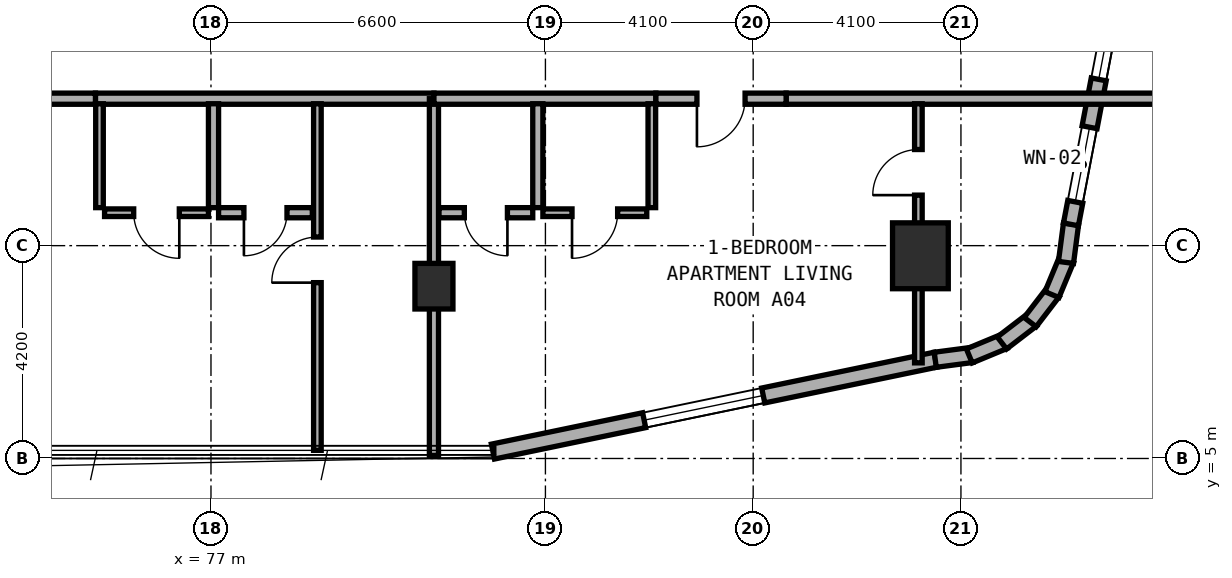
"""IFC4 building model, lengths in metres.
Left out: names, types, materials, properties, quantities, classifications, styles, units other than length and angle.
Written with IfcOpenShell. Run it as: python <this file> out.ifc"""

import sys

from ifc_helpers import new_model, si_unit, direction, frame, frame_2d, origin, origin_2d, place, context, subcontext, project, spatial, rectangle, extrude, element, fill, save


model = new_model("IFC4")
c1 = context("Model", 3, precision=1e-05, world=origin(), true_north=direction((0.0, 1.0)))
c2 = subcontext(c1, "Body", "Model", "MODEL_VIEW")
j1 = project(units=[si_unit("LENGTHUNIT", "METRE"), si_unit("PLANEANGLEUNIT", "RADIAN")], contexts=[c1])
p1 = place(None, origin())
s1 = spatial("IfcSite", under=j1, at=p1, CompositionType="ELEMENT")
p2 = place(p1, origin())
s2 = spatial("IfcBuilding", under=s1, at=p2, CompositionType="ELEMENT")
p3 = place(p2, frame((0.0, 0.0, 24.0)))
s3 = spatial("IfcBuildingStorey", under=s2, at=p3, CompositionType="ELEMENT", Elevation=24.0)
p4 = place(p3, frame((81.4, 8.4, 0.0), z_axis=(0.0, 0.0, 1.0), x_axis=(1.0, 0.0, 0.0)))
e1 = element("IfcColumn", 1, at=p4, inside=s3, PredefinedType="COLUMN", context=c2, shape_type="SweptSolid", body=[
    extrude(rectangle(XDim=0.75, YDim=0.9, at=origin_2d()), origin(), (0.0, 0.0, 1.0), 3.5),
])
p5 = place(p3, frame((91.0, 9.0, 0.0), z_axis=(0.0, 0.0, 1.0), x_axis=(1.0, 0.0, 0.0)))
e2 = element("IfcColumn", 2, at=p5, inside=s3, PredefinedType="COLUMN", context=c2, shape_type="SweptSolid", body=[
    extrude(rectangle(XDim=1.1, YDim=1.3, at=origin_2d()), origin(), (0.0, 0.0, 1.0), 3.5),
])
p6 = place(p3, frame((82.564, 5.136, 0.0), z_axis=(0.0, 0.0, 1.0), x_axis=(0.979128391325, 0.203242695569, 0.0)))
e3 = element("IfcWall", 3, at=p6, inside=s3, PredefinedType="STANDARD", context=c2, shape_type="SweptSolid", body=[
    extrude(rectangle(XDim=8.92, YDim=0.3, at=frame_2d((4.46, 0.0))), origin(), (0.0, 0.0, 1.0), 3.25),
])
p7 = place(p6, frame((3.048, 0.0, 0.8)))
e4 = element("IfcOpeningElement", 4, at=p7, cuts=e3, PredefinedType="OPENING", context=c2, shape_type="SweptSolid", body=[
    extrude(rectangle(XDim=2.4, YDim=1.6, at=frame_2d((1.2, 0.8))), frame((0.0, 0.16, 0.0), z_axis=(0.0, -1.0, 0.0), x_axis=(1.0, 0.0, 0.0)), (0.0, 0.0, 1.0), 0.32),
])
p8 = place(p3, frame((91.293, 6.948, 0.0), z_axis=(0.0, 0.0, 1.0), x_axis=(0.991486167159, 0.13021205909, 0.0)))
e5 = element("IfcWall", 5, at=p8, inside=s3, PredefinedType="STANDARD", context=c2, shape_type="SweptSolid", body=[
    extrude(rectangle(XDim=0.729, YDim=0.3, at=frame_2d((0.365, 0.0))), origin(), (0.0, 0.0, 1.0), 3.25),
])
for number, where, z_axis, x_axis in (
    (6, (91.965, 7.024, 0.0), (0.0, 0.0, 1.0), (0.924, 0.384, 0.0)),
    (7, (92.609, 7.279, 0.0), (0.0, 0.0, 1.0), (0.794, 0.608, 0.0)),
    (8, (93.166, 7.691, 0.0), (0.0, 0.0, 1.0), (0.609, 0.793, 0.0)),
):
    element("IfcWall", number, at=place(p3, frame(where, z_axis=z_axis, x_axis=x_axis)), inside=s3, PredefinedType="STANDARD", context=c2, shape_type="SweptSolid", body=[
        extrude(rectangle(XDim=0.746, YDim=0.3, at=frame_2d((0.373, 0.0))), origin(), (0.0, 0.0, 1.0), 3.25),
    ])
p9 = place(p3, frame((93.596, 8.234, 0.0), z_axis=(0.0, 0.0, 1.0), x_axis=(0.383430326427, 0.923569805037, 0.0)))
e9 = element("IfcWall", 9, at=p9, inside=s3, PredefinedType="STANDARD", context=c2, shape_type="SweptSolid", body=[
    extrude(rectangle(XDim=0.746, YDim=0.3, at=frame_2d((0.373, 0.0))), origin(), (0.0, 0.0, 1.0), 3.25),
])
p10 = place(p3, frame((93.873, 8.869, 0.0), z_axis=(0.0, 0.0, 1.0), x_axis=(0.129339184068, 0.991600411186, 0.0)))
e10 = element("IfcWall", 10, at=p10, inside=s3, PredefinedType="STANDARD", context=c2, shape_type="SweptSolid", body=[
    extrude(rectangle(XDim=0.764, YDim=0.3, at=frame_2d((0.382, 0.0))), origin(), (0.0, 0.0, 1.0), 3.25),
])
p11 = place(p3, frame((93.971, 9.62, 0.0), z_axis=(0.0, 0.0, 1.0), x_axis=(0.188087874316, 0.982152203854, 0.0)))
e11 = element("IfcWall", 11, at=p11, inside=s3, PredefinedType="STANDARD", context=c2, shape_type="SweptSolid", body=[
    extrude(rectangle(XDim=9.634, YDim=0.3, at=frame_2d((4.817, 0.0))), origin(), (0.0, 0.0, 1.0), 3.25),
])
p12 = place(p11, frame((0.452, 0.0, 0.85)))
e12 = element("IfcOpeningElement", 12, at=p12, cuts=e11, PredefinedType="OPENING", context=c2, shape_type="SweptSolid", body=[
    extrude(rectangle(XDim=1.5, YDim=1.5, at=frame_2d((0.75, 0.75))), frame((0.0, 0.16, 0.0), z_axis=(0.0, -1.0, 0.0), x_axis=(1.0, 0.0, 0.0)), (0.0, 0.0, 1.0), 0.32),
])
p13 = place(p11, frame((2.913, 0.0, 0.85)))
e13 = element("IfcOpeningElement", 13, at=p13, cuts=e11, PredefinedType="OPENING", context=c2, shape_type="SweptSolid", body=[
    extrude(rectangle(XDim=1.2, YDim=1.5, at=frame_2d((0.6, 0.75))), frame((0.0, 0.16, 0.0), z_axis=(0.0, -1.0, 0.0), x_axis=(1.0, 0.0, 0.0)), (0.0, 0.0, 1.0), 0.32),
])
p14 = place(p11, frame((5.928, 0.0, 0.8)))
e14 = element("IfcOpeningElement", 14, at=p14, cuts=e11, PredefinedType="OPENING", context=c2, shape_type="SweptSolid", body=[
    extrude(rectangle(XDim=2.4, YDim=1.6, at=frame_2d((1.2, 0.8))), frame((0.0, 0.16, 0.0), z_axis=(0.0, -1.0, 0.0), x_axis=(1.0, 0.0, 0.0)), (0.0, 0.0, 1.0), 0.32),
])
p15 = place(p3, frame((74.72, 12.1, 0.0), z_axis=(0.0, 0.0, 1.0), x_axis=(1.0, 0.0, 0.0)))
e15 = element("IfcWall", 15, at=p15, inside=s3, PredefinedType="SOLIDWALL", context=c2, shape_type="SweptSolid", body=[
    extrude(rectangle(XDim=6.68, YDim=0.22, at=frame_2d((3.34, 0.0))), origin(), (0.0, 0.0, 1.0), 2.725),
])
p16 = place(p3, frame((65.85, 12.1, 0.0), z_axis=(0.0, 0.0, 1.0), x_axis=(1.0, 0.0, 0.0)))
e16 = element("IfcWall", 16, at=p16, inside=s3, PredefinedType="SOLIDWALL", context=c2, shape_type="SweptSolid", body=[
    extrude(rectangle(XDim=8.87, YDim=0.22, at=frame_2d((4.435, 0.0))), origin(), (0.0, 0.0, 1.0), 2.725),
])
p17 = place(p16, frame((3.96, 0.0, 0.0)))
e17 = element("IfcOpeningElement", 17, at=p17, cuts=e16, PredefinedType="OPENING", context=c2, shape_type="SweptSolid", body=[
    extrude(rectangle(XDim=0.95, YDim=2.1, at=frame_2d((0.475, 1.05))), frame((0.0, 0.12, 0.0), z_axis=(0.0, -1.0, 0.0), x_axis=(1.0, 0.0, 0.0)), (0.0, 0.0, 1.0), 0.24),
])
p18 = place(p3, frame((79.1, 5.16, 0.0), z_axis=(0.0, 0.0, 1.0), x_axis=(0.0, 1.0, 0.0)))
e18 = element("IfcWall", 18, at=p18, inside=s3, PredefinedType="PARTITIONING", context=c2, shape_type="SweptSolid", body=[
    extrude(rectangle(XDim=6.84, YDim=0.15, at=frame_2d((3.42, 0.0))), origin(), (0.0, 0.0, 1.0), 2.865),
])
p19 = place(p18, frame((3.31, 0.0, 0.0)))
e19 = element("IfcOpeningElement", 19, at=p19, cuts=e18, PredefinedType="OPENING", context=c2, shape_type="SweptSolid", body=[
    extrude(rectangle(XDim=0.9, YDim=2.1, at=frame_2d((0.45, 1.05))), frame((0.0, 0.085, 0.0), z_axis=(0.0, -1.0, 0.0), x_axis=(1.0, 0.0, 0.0)), (0.0, 0.0, 1.0), 0.17),
])
p20 = place(p3, frame((77.05, 9.95, 0.0), z_axis=(0.0, 0.0, 1.0), x_axis=(0.0, 1.0, 0.0)))
e20 = element("IfcWall", 20, at=p20, inside=s3, PredefinedType="PLUMBINGWALL", context=c2, shape_type="SweptSolid", body=[
    extrude(rectangle(XDim=2.05, YDim=0.2, at=frame_2d((1.025, 0.0))), origin(), (0.0, 0.0, 1.0), 2.985),
])
p21 = place(p3, frame((74.8, 9.95, 0.0), z_axis=(0.0, 0.0, 1.0), x_axis=(0.0, 1.0, 0.0)))
e21 = element("IfcWall", 21, at=p21, inside=s3, PredefinedType="PARTITIONING", context=c2, shape_type="SweptSolid", body=[
    extrude(rectangle(XDim=2.05, YDim=0.15, at=frame_2d((1.025, 0.0))), origin(), (0.0, 0.0, 1.0), 2.985),
])
p22 = place(p3, frame((77.15, 9.85, 0.0), z_axis=(0.0, 0.0, 1.0), x_axis=(1.0, 0.0, 0.0)))
e22 = element("IfcWall", 22, at=p22, inside=s3, PredefinedType="PLUMBINGWALL", context=c2, shape_type="SweptSolid", body=[
    extrude(rectangle(XDim=1.85, YDim=0.2, at=frame_2d((0.925, 0.0))), origin(), (0.0, 0.0, 1.0), 3.22),
])
p23 = place(p22, frame((0.5, 0.0, 0.0)))
e23 = element("IfcOpeningElement", 23, at=p23, cuts=e22, PredefinedType="OPENING", context=c2, shape_type="SweptSolid", body=[
    extrude(rectangle(XDim=0.85, YDim=2.1, at=frame_2d((0.425, 1.05))), frame((0.0, 0.11, 0.0), z_axis=(0.0, -1.0, 0.0), x_axis=(1.0, 0.0, 0.0)), (0.0, 0.0, 1.0), 0.22),
])
p24 = place(p3, frame((74.9, 9.85, 0.0), z_axis=(0.0, 0.0, 1.0), x_axis=(1.0, 0.0, 0.0)))
e24 = element("IfcWall", 24, at=p24, inside=s3, PredefinedType="PARTITIONING", context=c2, shape_type="SweptSolid", body=[
    extrude(rectangle(XDim=2.05, YDim=0.15, at=frame_2d((1.025, 0.0))), origin(), (0.0, 0.0, 1.0), 3.22),
])
p25 = place(p24, frame((0.575, 0.0, 0.0)))
e25 = element("IfcOpeningElement", 25, at=p25, cuts=e24, PredefinedType="OPENING", context=c2, shape_type="SweptSolid", body=[
    extrude(rectangle(XDim=0.9, YDim=2.1, at=frame_2d((0.45, 1.05))), frame((0.0, 0.085, 0.0), z_axis=(0.0, -1.0, 0.0), x_axis=(1.0, 0.0, 0.0)), (0.0, 0.0, 1.0), 0.17),
])
p26 = place(p3, frame((81.4, 5.06, 0.0), z_axis=(0.0, 0.0, 1.0), x_axis=(0.0, 1.0, 0.0)))
e26 = element("IfcWall", 26, at=p26, inside=s3, PredefinedType="SOLIDWALL", context=c2, shape_type="SweptSolid", body=[
    extrude(rectangle(XDim=7.04, YDim=0.18, at=frame_2d((3.52, 0.0))), origin(), (0.0, 0.0, 1.0), 2.725),
])
p27 = place(p3, frame((81.4, 12.1, 0.0), z_axis=(0.0, 0.0, 1.0), x_axis=(1.0, 0.0, 0.0)))
e27 = element("IfcWall", 27, at=p27, inside=s3, PredefinedType="SOLIDWALL", context=c2, shape_type="SweptSolid", body=[
    extrude(rectangle(XDim=4.38, YDim=0.22, at=frame_2d((2.19, 0.0))), origin(), (0.0, 0.0, 1.0), 2.725),
])
p28 = place(p3, frame((88.35, 12.1, 0.0), z_axis=(0.0, 0.0, 1.0), x_axis=(1.0, 0.0, 0.0)))
e28 = element("IfcWall", 28, at=p28, inside=s3, PredefinedType="SOLIDWALL", context=c2, shape_type="SweptSolid", body=[
    extrude(rectangle(XDim=7.41, YDim=0.22, at=frame_2d((3.705, 0.0))), origin(), (0.0, 0.0, 1.0), 2.865),
])
p29 = place(p3, frame((85.78, 12.1, 0.0), z_axis=(0.0, 0.0, 1.0), x_axis=(1.0, 0.0, 0.0)))
e29 = element("IfcWall", 29, at=p29, inside=s3, PredefinedType="SOLIDWALL", context=c2, shape_type="SweptSolid", body=[
    extrude(rectangle(XDim=2.57, YDim=0.22, at=frame_2d((1.285, 0.0))), origin(), (0.0, 0.0, 1.0), 3.22),
])
p30 = place(p29, frame((0.81, 0.0, 0.0)))
e30 = element("IfcOpeningElement", 30, at=p30, cuts=e29, PredefinedType="OPENING", context=c2, shape_type="SweptSolid", body=[
    extrude(rectangle(XDim=0.95, YDim=2.1, at=frame_2d((0.475, 1.05))), frame((0.0, 0.12, 0.0), z_axis=(0.0, -1.0, 0.0), x_axis=(1.0, 0.0, 0.0)), (0.0, 0.0, 1.0), 0.24),
])
p31 = place(p3, frame((90.96, 6.887, 0.0), z_axis=(0.0, 0.0, 1.0), x_axis=(0.0, 1.0, 0.0)))
e31 = element("IfcWall", 31, at=p31, inside=s3, PredefinedType="PARTITIONING", context=c2, shape_type="SweptSolid", body=[
    extrude(rectangle(XDim=5.113, YDim=0.15, at=frame_2d((2.557, 0.0))), origin(), (0.0, 0.0, 1.0), 2.865),
])
p32 = place(p31, frame((3.31, 0.0, 0.0)))
e32 = element("IfcOpeningElement", 32, at=p32, cuts=e31, PredefinedType="OPENING", context=c2, shape_type="SweptSolid", body=[
    extrude(rectangle(XDim=0.9, YDim=2.1, at=frame_2d((0.45, 1.05))), frame((0.0, 0.085, 0.0), z_axis=(0.0, -1.0, 0.0), x_axis=(1.0, 0.0, 0.0)), (0.0, 0.0, 1.0), 0.17),
])
p33 = place(p3, frame((83.45, 9.95, 0.0), z_axis=(0.0, 0.0, 1.0), x_axis=(0.0, 1.0, 0.0)))
e33 = element("IfcWall", 33, at=p33, inside=s3, PredefinedType="PLUMBINGWALL", context=c2, shape_type="SweptSolid", body=[
    extrude(rectangle(XDim=2.05, YDim=0.2, at=frame_2d((1.025, 0.0))), origin(), (0.0, 0.0, 1.0), 3.22),
])
p34 = place(p3, frame((85.7, 9.95, 0.0), z_axis=(0.0, 0.0, 1.0), x_axis=(0.0, 1.0, 0.0)))
e34 = element("IfcWall", 34, at=p34, inside=s3, PredefinedType="PARTITIONING", context=c2, shape_type="SweptSolid", body=[
    extrude(rectangle(XDim=2.05, YDim=0.15, at=frame_2d((1.025, 0.0))), origin(), (0.0, 0.0, 1.0), 3.22),
])
p35 = place(p3, frame((81.5, 9.85, 0.0), z_axis=(0.0, 0.0, 1.0), x_axis=(1.0, 0.0, 0.0)))
e35 = element("IfcWall", 35, at=p35, inside=s3, PredefinedType="PLUMBINGWALL", context=c2, shape_type="SweptSolid", body=[
    extrude(rectangle(XDim=1.85, YDim=0.2, at=frame_2d((0.925, 0.0))), origin(), (0.0, 0.0, 1.0), 2.725),
])
p36 = place(p35, frame((0.5, 0.0, 0.0)))
e36 = element("IfcOpeningElement", 36, at=p36, cuts=e35, PredefinedType="OPENING", context=c2, shape_type="SweptSolid", body=[
    extrude(rectangle(XDim=0.85, YDim=2.1, at=frame_2d((0.425, 1.05))), frame((0.0, 0.11, 0.0), z_axis=(0.0, -1.0, 0.0), x_axis=(1.0, 0.0, 0.0)), (0.0, 0.0, 1.0), 0.22),
])
p37 = place(p3, frame((83.55, 9.85, 0.0), z_axis=(0.0, 0.0, 1.0), x_axis=(1.0, 0.0, 0.0)))
e37 = element("IfcWall", 37, at=p37, inside=s3, PredefinedType="PARTITIONING", context=c2, shape_type="SweptSolid", body=[
    extrude(rectangle(XDim=2.05, YDim=0.15, at=frame_2d((1.025, 0.0))), origin(), (0.0, 0.0, 1.0), 3.22),
])
p38 = place(p37, frame((0.575, 0.0, 0.0)))
e38 = element("IfcOpeningElement", 38, at=p38, cuts=e37, PredefinedType="OPENING", context=c2, shape_type="SweptSolid", body=[
    extrude(rectangle(XDim=0.9, YDim=2.1, at=frame_2d((0.45, 1.05))), frame((0.0, 0.085, 0.0), z_axis=(0.0, -1.0, 0.0), x_axis=(1.0, 0.0, 0.0)), (0.0, 0.0, 1.0), 0.17),
])
p39 = place(p7, origin())
e39 = element("IfcWindow", 39, at=p39, inside=s3, PartitioningType="SINGLE_PANEL", PredefinedType="WINDOW", context=c2, shape_type="SweptSolid", body=[
    extrude(rectangle(XDim=2.4, YDim=1.6, at=frame_2d((1.2, 0.8))), frame((0.0, 0.03, 0.0), z_axis=(0.0, -1.0, 0.0), x_axis=(1.0, 0.0, 0.0)), (0.0, 0.0, 1.0), 0.06),
])
fill(e4, e39)
p40 = place(p12, origin())
e40 = element("IfcWindow", 40, at=p40, inside=s3, PartitioningType="SINGLE_PANEL", PredefinedType="WINDOW", context=c2, shape_type="SweptSolid", body=[
    extrude(rectangle(XDim=1.5, YDim=1.5, at=frame_2d((0.75, 0.75))), frame((0.0, 0.03, 0.0), z_axis=(0.0, -1.0, 0.0), x_axis=(1.0, 0.0, 0.0)), (0.0, 0.0, 1.0), 0.06),
])
fill(e12, e40)
p41 = place(p13, origin())
e41 = element("IfcWindow", 41, at=p41, inside=s3, PartitioningType="SINGLE_PANEL", PredefinedType="WINDOW", context=c2, shape_type="SweptSolid", body=[
    extrude(rectangle(XDim=1.2, YDim=1.5, at=frame_2d((0.6, 0.75))), frame((0.0, 0.03, 0.0), z_axis=(0.0, -1.0, 0.0), x_axis=(1.0, 0.0, 0.0)), (0.0, 0.0, 1.0), 0.06),
])
fill(e13, e41)
p42 = place(p19, origin())
e42 = element("IfcDoor", 42, at=p42, inside=s3, OperationType="SINGLE_SWING_LEFT", PredefinedType="DOOR", context=c2, shape_type="SweptSolid", body=[
    extrude(rectangle(XDim=0.9, YDim=2.1, at=frame_2d((0.45, 1.05))), frame((0.0, 0.025, 0.0), z_axis=(0.0, -1.0, 0.0), x_axis=(1.0, 0.0, 0.0)), (0.0, 0.0, 1.0), 0.05),
])
fill(e19, e42)
p43 = place(p23, frame((0.85, 0.0, 0.0), z_axis=(0.0, 0.0, 1.0), x_axis=(-1.0, 0.0, 0.0)))
e43 = element("IfcDoor", 43, at=p43, inside=s3, OperationType="SINGLE_SWING_RIGHT", PredefinedType="DOOR", context=c2, shape_type="SweptSolid", body=[
    extrude(rectangle(XDim=0.85, YDim=2.1, at=frame_2d((0.425, 1.05))), frame((0.0, 0.025, 0.0), z_axis=(0.0, -1.0, 0.0), x_axis=(1.0, 0.0, 0.0)), (0.0, 0.0, 1.0), 0.05),
])
fill(e23, e43)
p44 = place(p25, frame((0.9, 0.0, 0.0), z_axis=(0.0, 0.0, 1.0), x_axis=(-1.0, 0.0, 0.0)))
e44 = element("IfcDoor", 44, at=p44, inside=s3, OperationType="SINGLE_SWING_LEFT", PredefinedType="DOOR", context=c2, shape_type="SweptSolid", body=[
    extrude(rectangle(XDim=0.9, YDim=2.1, at=frame_2d((0.45, 1.05))), frame((0.0, 0.025, 0.0), z_axis=(0.0, -1.0, 0.0), x_axis=(1.0, 0.0, 0.0)), (0.0, 0.0, 1.0), 0.05),
])
fill(e25, e44)
p45 = place(p30, frame((0.95, 0.0, 0.0), z_axis=(0.0, 0.0, 1.0), x_axis=(-1.0, 0.0, 0.0)))
e45 = element("IfcDoor", 45, at=p45, inside=s3, OperationType="SINGLE_SWING_RIGHT", PredefinedType="DOOR", context=c2, shape_type="SweptSolid", body=[
    extrude(rectangle(XDim=0.95, YDim=2.1, at=frame_2d((0.475, 1.05))), frame((0.0, 0.025, 0.0), z_axis=(0.0, -1.0, 0.0), x_axis=(1.0, 0.0, 0.0)), (0.0, 0.0, 1.0), 0.05),
])
fill(e30, e45)
p46 = place(p32, origin())
e46 = element("IfcDoor", 46, at=p46, inside=s3, OperationType="SINGLE_SWING_LEFT", PredefinedType="DOOR", context=c2, shape_type="SweptSolid", body=[
    extrude(rectangle(XDim=0.9, YDim=2.1, at=frame_2d((0.45, 1.05))), frame((0.0, 0.025, 0.0), z_axis=(0.0, -1.0, 0.0), x_axis=(1.0, 0.0, 0.0)), (0.0, 0.0, 1.0), 0.05),
])
fill(e32, e46)
p47 = place(p36, frame((0.85, 0.0, 0.0), z_axis=(0.0, 0.0, 1.0), x_axis=(-1.0, 0.0, 0.0)))
e47 = element("IfcDoor", 47, at=p47, inside=s3, OperationType="SINGLE_SWING_LEFT", PredefinedType="DOOR", context=c2, shape_type="SweptSolid", body=[
    extrude(rectangle(XDim=0.85, YDim=2.1, at=frame_2d((0.425, 1.05))), frame((0.0, 0.025, 0.0), z_axis=(0.0, -1.0, 0.0), x_axis=(1.0, 0.0, 0.0)), (0.0, 0.0, 1.0), 0.05),
])
fill(e36, e47)
p48 = place(p38, frame((0.9, 0.0, 0.0), z_axis=(0.0, 0.0, 1.0), x_axis=(-1.0, 0.0, 0.0)))
e48 = element("IfcDoor", 48, at=p48, inside=s3, OperationType="SINGLE_SWING_RIGHT", PredefinedType="DOOR", context=c2, shape_type="SweptSolid", body=[
    extrude(rectangle(XDim=0.9, YDim=2.1, at=frame_2d((0.45, 1.05))), frame((0.0, 0.025, 0.0), z_axis=(0.0, -1.0, 0.0), x_axis=(1.0, 0.0, 0.0)), (0.0, 0.0, 1.0), 0.05),
])
fill(e38, e48)
save(model, sys.argv[1])
